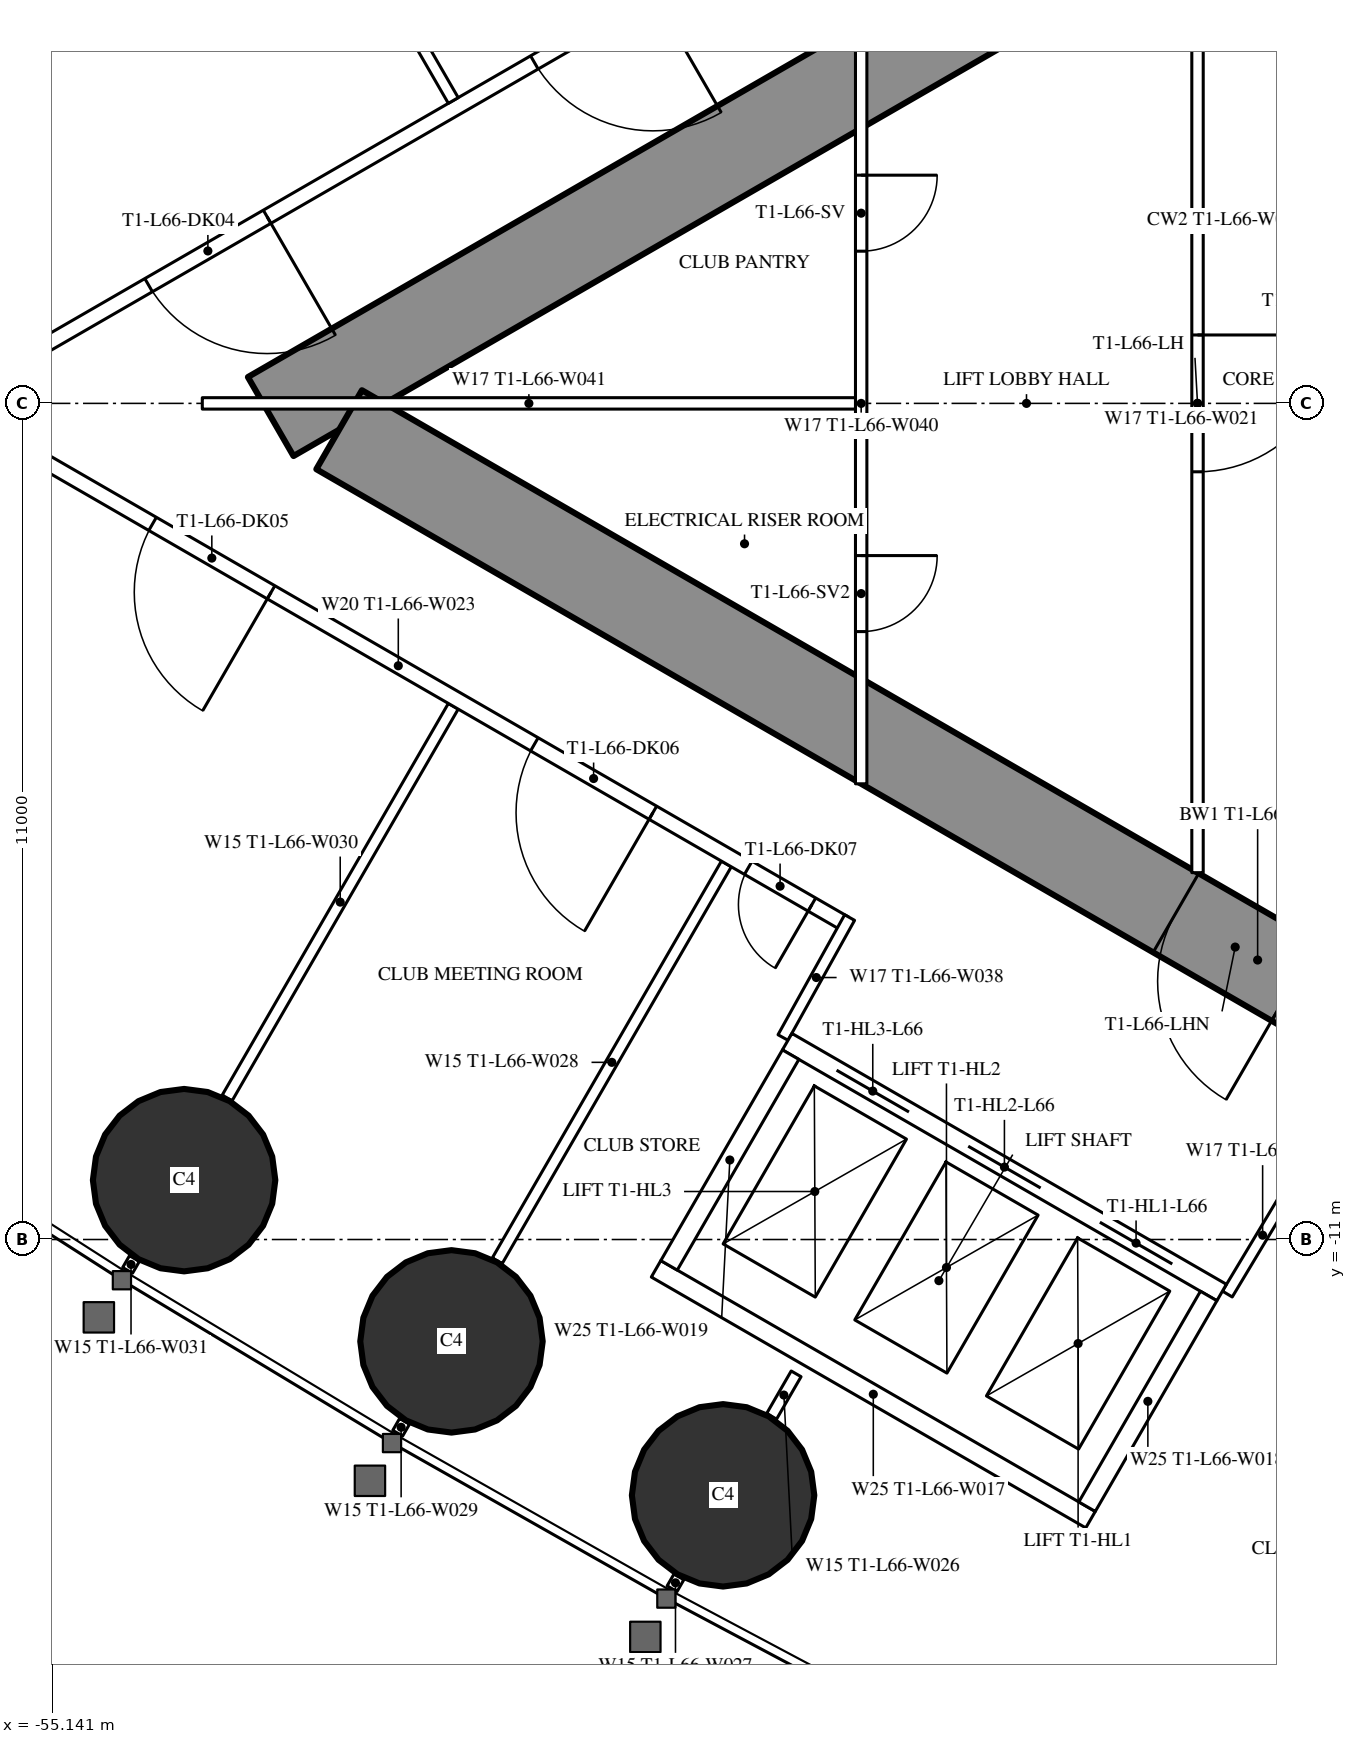
"""IFC4 building model, lengths in metres.
Left out: names, types, materials, properties, quantities, classifications, styles, units other than length and angle.
Written with IfcOpenShell. Run it as: python <this file> out.ifc"""

import sys

from ifc_helpers import new_model, si_unit, direction, frame, frame_2d, origin, origin_2d, place, context, subcontext, project, spatial, rectangle, circle, extrude, element, fill, save


model = new_model("IFC4")
c1 = context("Model", 3, precision=1e-05, world=origin(), true_north=direction((0.0, 1.0)))
c2 = subcontext(c1, "Body", "Model", "MODEL_VIEW")
j1 = project(units=[si_unit("LENGTHUNIT", "METRE"), si_unit("PLANEANGLEUNIT", "RADIAN")], contexts=[c1])
p1 = place(None, origin())
s1 = spatial("IfcSite", under=j1, at=p1, CompositionType="ELEMENT")
p2 = place(p1, origin())
s2 = spatial("IfcBuilding", under=s1, at=p2, CompositionType="ELEMENT")
p3 = place(p2, frame((0.0, 0.0, 247.7)))
s3 = spatial("IfcBuildingStorey", under=s2, at=p3, CompositionType="ELEMENT", Elevation=247.7)
for number, where, z_axis, x_axis in (
    (1, (-53.408, -10.219, 0.0), (0.0, 0.0, 1.0), (1.0, 0.0, 0.0)),
    (2, (-49.89, -12.34, 0.0), (0.0, 0.0, 1.0), (1.0, 0.0, 0.0)),
    (3, (-46.317, -14.365, 0.0), (0.0, 0.0, 1.0), (1.0, 0.0, 0.0)),
):
    element("IfcColumn", number, at=place(p3, frame(where, z_axis=z_axis, x_axis=x_axis)), inside=s3, PredefinedType="COLUMN", context=c2, shape_type="SweptSolid", body=[
        extrude(circle(Radius=1.2, at=origin_2d()), origin(), (0.0, 0.0, 1.0), 4.2),
    ])
p4 = place(p3, frame((-27.2, 14.3, 0.0), z_axis=(0.0, 0.0, 1.0), x_axis=(-0.866026593062, -0.499997940104, 0.0)))
e4 = element("IfcWall", 4, at=p4, inside=s3, PredefinedType="SHEAR", context=c2, shape_type="SweptSolid", body=[
    extrude(rectangle(XDim=28.946, YDim=1.2, at=frame_2d((14.473, 0.0))), origin(), (0.0, 0.0, 1.0), 4.2),
])
p5 = place(p4, frame((4.6, 0.0, 0.0)))
e5 = element("IfcOpeningElement", 5, at=p5, cuts=e4, PredefinedType="OPENING", context=c2, shape_type="SweptSolid", body=[
    extrude(rectangle(XDim=1.0, YDim=2.2, at=frame_2d((0.5, 1.1))), frame((0.0, 0.61, 0.0), z_axis=(0.0, -1.0, 0.0), x_axis=(1.0, 0.0, 0.0)), (0.0, 0.0, 1.0), 1.22),
])
p6 = place(p4, frame((13.395, 0.0, 0.0)))
e6 = element("IfcOpeningElement", 6, at=p6, cuts=e4, PredefinedType="OPENING", context=c2, shape_type="SweptSolid", body=[
    extrude(rectangle(XDim=1.8, YDim=2.2, at=frame_2d((0.9, 1.1))), frame((0.0, 0.61, 0.0), z_axis=(0.0, -1.0, 0.0), x_axis=(1.0, 0.0, 0.0)), (0.0, 0.0, 1.0), 1.22),
])
p7 = place(p3, frame((-27.2, -14.3, 0.0), z_axis=(0.0, 0.0, 1.0), x_axis=(-0.866024021859, 0.500002393557, 0.0)))
e7 = element("IfcWall", 7, at=p7, inside=s3, PredefinedType="SHEAR", context=c2, shape_type="SweptSolid", body=[
    extrude(rectangle(XDim=27.907, YDim=1.2, at=frame_2d((13.954, 0.0))), origin(), (0.0, 0.0, 1.0), 4.2),
])
p8 = place(p7, frame((4.6, 0.0, 0.0)))
e8 = element("IfcOpeningElement", 8, at=p8, cuts=e7, PredefinedType="OPENING", context=c2, shape_type="SweptSolid", body=[
    extrude(rectangle(XDim=1.0, YDim=2.2, at=frame_2d((0.5, 1.1))), frame((0.0, 0.61, 0.0), z_axis=(0.0, -1.0, 0.0), x_axis=(1.0, 0.0, 0.0)), (0.0, 0.0, 1.0), 1.22),
])
p9 = place(p7, frame((13.395, 0.0, 0.0)))
e9 = element("IfcOpeningElement", 9, at=p9, cuts=e7, PredefinedType="OPENING", context=c2, shape_type="SweptSolid", body=[
    extrude(rectangle(XDim=1.8, YDim=2.2, at=frame_2d((0.9, 1.1))), frame((0.0, 0.61, 0.0), z_axis=(0.0, -1.0, 0.0), x_axis=(1.0, 0.0, 0.0)), (0.0, 0.0, 1.0), 1.22),
])
p10 = place(p3, frame((-28.681, 16.101, 0.0), z_axis=(0.0, 0.0, 1.0), x_axis=(-0.866024860443, -0.500000941094, 0.0)))
e10 = element("IfcWall", 10, at=p10, inside=s3, PredefinedType="PARTITIONING", context=c2, shape_type="SweptSolid", body=[
    extrude(rectangle(XDim=32.201, YDim=0.2, at=frame_2d((16.101, 0.0))), origin(), (0.0, 0.0, 1.0), 3.95),
])
p11 = place(p10, frame((7.266, 0.0, 0.0)))
e11 = element("IfcOpeningElement", 11, at=p11, cuts=e10, PredefinedType="OPENING", context=c2, shape_type="SweptSolid", body=[
    extrude(rectangle(XDim=1.8, YDim=2.2, at=frame_2d((0.9, 1.1))), frame((0.0, 0.11, 0.0), z_axis=(0.0, -1.0, 0.0), x_axis=(1.0, 0.0, 0.0)), (0.0, 0.0, 1.0), 0.22),
])
p12 = place(p10, frame((17.281, 0.0, 0.0)))
e12 = element("IfcOpeningElement", 12, at=p12, cuts=e10, PredefinedType="OPENING", context=c2, shape_type="SweptSolid", body=[
    extrude(rectangle(XDim=1.8, YDim=2.2, at=frame_2d((0.9, 1.1))), frame((0.0, 0.11, 0.0), z_axis=(0.0, -1.0, 0.0), x_axis=(1.0, 0.0, 0.0)), (0.0, 0.0, 1.0), 0.22),
])
p13 = place(p10, frame((21.43, 0.0, 0.0)))
e13 = element("IfcOpeningElement", 13, at=p13, cuts=e10, PredefinedType="OPENING", context=c2, shape_type="SweptSolid", body=[
    extrude(rectangle(XDim=1.8, YDim=2.2, at=frame_2d((0.9, 1.1))), frame((0.0, 0.11, 0.0), z_axis=(0.0, -1.0, 0.0), x_axis=(1.0, 0.0, 0.0)), (0.0, 0.0, 1.0), 0.22),
])
p14 = place(p10, frame((27.29, 0.0, 0.0)))
e14 = element("IfcOpeningElement", 14, at=p14, cuts=e10, PredefinedType="OPENING", context=c2, shape_type="SweptSolid", body=[
    extrude(rectangle(XDim=1.8, YDim=2.2, at=frame_2d((0.9, 1.1))), frame((0.0, 0.11, 0.0), z_axis=(0.0, -1.0, 0.0), x_axis=(1.0, 0.0, 0.0)), (0.0, 0.0, 1.0), 0.22),
])
p15 = place(p3, frame((-49.866, 3.985, 0.0), z_axis=(0.0, 0.0, 1.0), x_axis=(-0.500000694566, 0.866025002776, 0.0)))
e15 = element("IfcWall", 15, at=p15, inside=s3, PredefinedType="PARTITIONING", context=c2, shape_type="SweptSolid", body=[
    extrude(rectangle(XDim=5.95, YDim=0.15, at=frame_2d((2.975, 0.0))), origin(), (0.0, 0.0, 1.0), 3.05),
])
p16 = place(p3, frame((-46.898, -15.439, 0.0), z_axis=(0.0, 0.0, 1.0), x_axis=(-0.500232303069, -0.865891241997, 0.0)))
e16 = element("IfcWall", 16, at=p16, inside=s3, PredefinedType="PARTITIONING", context=c2, shape_type="SweptSolid", body=[
    extrude(rectangle(XDim=0.18, YDim=0.15, at=frame_2d((0.09, 0.0))), origin(), (0.0, 0.0, 1.0), 3.05),
])
p17 = place(p3, frame((-46.274, -6.059, 0.0), z_axis=(0.0, 0.0, 1.0), x_axis=(-0.500020471368, -0.866013584312, 0.0)))
e17 = element("IfcWall", 17, at=p17, inside=s3, PredefinedType="PARTITIONING", context=c2, shape_type="SweptSolid", body=[
    extrude(rectangle(XDim=6.028, YDim=0.15, at=frame_2d((3.014, 0.0))), origin(), (0.0, 0.0, 1.0), 3.05),
])
p18 = place(p3, frame((-50.508, -13.392, 0.0), z_axis=(0.0, 0.0, 1.0), x_axis=(-0.499644091975, -0.866230789891, 0.0)))
e18 = element("IfcWall", 18, at=p18, inside=s3, PredefinedType="PARTITIONING", context=c2, shape_type="SweptSolid", body=[
    extrude(rectangle(XDim=0.18, YDim=0.15, at=frame_2d((0.09, 0.0))), origin(), (0.0, 0.0, 1.0), 3.05),
])
p19 = place(p3, frame((-49.866, -3.985, 0.0), z_axis=(0.0, 0.0, 1.0), x_axis=(-0.500000694566, -0.866025002776, 0.0)))
e19 = element("IfcWall", 19, at=p19, inside=s3, PredefinedType="PARTITIONING", context=c2, shape_type="SweptSolid", body=[
    extrude(rectangle(XDim=5.95, YDim=0.15, at=frame_2d((2.975, 0.0))), origin(), (0.0, 0.0, 1.0), 3.05),
])
p20 = place(p3, frame((-54.061, -11.25, 0.0), z_axis=(0.0, 0.0, 1.0), x_axis=(-0.500391173478, -0.865799441849, 0.0)))
e20 = element("IfcWall", 20, at=p20, inside=s3, PredefinedType="PARTITIONING", context=c2, shape_type="SweptSolid", body=[
    extrude(rectangle(XDim=0.179, YDim=0.15, at=frame_2d((0.089, 0.0))), origin(), (0.0, 0.0, 1.0), 3.05),
])
p21 = place(p3, frame((-45.356, -12.767, 0.0), z_axis=(0.0, 0.0, 1.0), x_axis=(-0.499886366516, -0.866091000168, 0.0)))
e21 = element("IfcWall", 21, at=p21, inside=s3, PredefinedType="PARTITIONING", context=c2, shape_type="SweptSolid", body=[
    extrude(rectangle(XDim=0.645, YDim=0.15, at=frame_2d((0.322, 0.0))), origin(), (0.0, 0.0, 1.0), 3.95),
])
p22 = place(p3, frame((-44.715, -6.844, 0.0), z_axis=(0.0, 0.0, 1.0), x_axis=(-0.866025261224, 0.500000246922, 0.0)))
e22 = element("IfcWall", 22, at=p22, inside=s3, PredefinedType="PARTITIONING", context=c2, shape_type="SweptSolid", body=[
    extrude(rectangle(XDim=13.567, YDim=0.2, at=frame_2d((6.783, 0.0))), origin(), (0.0, 0.0, 1.0), 3.95),
])
p23 = place(p22, frame((8.716, 0.0, 0.0)))
e23 = element("IfcOpeningElement", 23, at=p23, cuts=e22, PredefinedType="OPENING", context=c2, shape_type="SweptSolid", body=[
    extrude(rectangle(XDim=1.8, YDim=2.2, at=frame_2d((0.9, 1.1))), frame((0.0, 0.11, 0.0), z_axis=(0.0, -1.0, 0.0), x_axis=(1.0, 0.0, 0.0)), (0.0, 0.0, 1.0), 0.22),
])
p24 = place(p22, frame((2.916, 0.0, 0.0)))
e24 = element("IfcOpeningElement", 24, at=p24, cuts=e22, PredefinedType="OPENING", context=c2, shape_type="SweptSolid", body=[
    extrude(rectangle(XDim=1.8, YDim=2.2, at=frame_2d((0.9, 1.1))), frame((0.0, 0.11, 0.0), z_axis=(0.0, -1.0, 0.0), x_axis=(1.0, 0.0, 0.0)), (0.0, 0.0, 1.0), 0.22),
])
p25 = place(p22, frame((0.5, 0.0, 0.0)))
e25 = element("IfcOpeningElement", 25, at=p25, cuts=e22, PredefinedType="OPENING", context=c2, shape_type="SweptSolid", body=[
    extrude(rectangle(XDim=0.967, YDim=2.2, at=frame_2d((0.483, 1.1))), frame((0.0, 0.11, 0.0), z_axis=(0.0, -1.0, 0.0), x_axis=(1.0, 0.0, 0.0)), (0.0, 0.0, 1.0), 0.22),
])
for number, where, z_axis, x_axis in (
    (26, (-44.652, -6.764, 0.0), (0.0, 0.0, 1.0), (-0.486, -0.874, 0.0)),
    (27, (-39.683, -11.718, 0.0), (0.0, 0.0, 1.0), (0.514, 0.858, 0.0)),
):
    element("IfcWall", number, at=place(p3, frame(where, z_axis=z_axis, x_axis=x_axis)), inside=s3, PredefinedType="PARTITIONING", context=c2, shape_type="SweptSolid", body=[
        extrude(rectangle(XDim=1.805, YDim=0.15, at=frame_2d((0.903, 0.0))), origin(), (0.0, 0.0, 1.0), 3.95),
    ])
p26 = place(p3, frame((-40.075, 6.174, 0.0), z_axis=(0.0, 0.0, 1.0), x_axis=(0.0, -1.0, 0.0)))
e28 = element("IfcWall", 28, at=p26, inside=s3, PredefinedType="PARTITIONING", context=c2, shape_type="SweptSolid", body=[
    extrude(rectangle(XDim=12.348, YDim=0.15, at=frame_2d((6.174, 0.0))), origin(), (0.0, 0.0, 1.0), 3.95),
])
p27 = place(p26, frame((5.274, 0.0, 0.0)))
e29 = element("IfcOpeningElement", 29, at=p27, cuts=e28, PredefinedType="OPENING", context=c2, shape_type="SweptSolid", body=[
    extrude(rectangle(XDim=1.8, YDim=2.2, at=frame_2d((0.9, 1.1))), frame((0.0, 0.085, 0.0), z_axis=(0.0, -1.0, 0.0), x_axis=(1.0, 0.0, 0.0)), (0.0, 0.0, 1.0), 0.17),
])
p28 = place(p3, frame((-44.5, 5.005, 0.0), z_axis=(0.0, 0.0, 1.0), x_axis=(0.0, -1.0, 0.0)))
e30 = element("IfcWall", 30, at=p28, inside=s3, PredefinedType="PARTITIONING", context=c2, shape_type="SweptSolid", body=[
    extrude(rectangle(XDim=10.009, YDim=0.15, at=frame_2d((5.005, 0.0))), origin(), (0.0, 0.0, 1.0), 3.1),
])
p29 = place(p28, frame((2.002, 0.0, 0.0)))
e31 = element("IfcOpeningElement", 31, at=p29, cuts=e30, PredefinedType="OPENING", context=c2, shape_type="SweptSolid", body=[
    extrude(rectangle(XDim=1.0, YDim=2.2, at=frame_2d((0.5, 1.1))), frame((0.0, 0.085, 0.0), z_axis=(0.0, -1.0, 0.0), x_axis=(1.0, 0.0, 0.0)), (0.0, 0.0, 1.0), 0.17),
])
p30 = place(p28, frame((7.007, 0.0, 0.0)))
e32 = element("IfcOpeningElement", 32, at=p30, cuts=e30, PredefinedType="OPENING", context=c2, shape_type="SweptSolid", body=[
    extrude(rectangle(XDim=1.0, YDim=2.2, at=frame_2d((0.5, 1.1))), frame((0.0, 0.085, 0.0), z_axis=(0.0, -1.0, 0.0), x_axis=(1.0, 0.0, 0.0)), (0.0, 0.0, 1.0), 0.17),
])
p31 = place(p3, frame((-44.575, 0.0, 0.0), z_axis=(0.0, 0.0, 1.0), x_axis=(-1.0, 0.0, 0.0)))
e33 = element("IfcWall", 33, at=p31, inside=s3, PredefinedType="PARTITIONING", context=c2, shape_type="SweptSolid", body=[
    extrude(rectangle(XDim=8.593, YDim=0.15, at=frame_2d((4.297, 0.0))), origin(), (0.0, 0.0, 1.0), 3.05),
])
p32 = place(p3, frame((-39.758, -11.697, 0.0), z_axis=(0.0, 0.0, 1.0), x_axis=(-0.866024194504, 0.500002094529, 0.0)))
e34 = element("IfcWall", 34, at=p32, inside=s3, PredefinedType="PARTITIONING", context=c2, shape_type="SweptSolid", body=[
    extrude(rectangle(XDim=6.6, YDim=0.25, at=frame_2d((3.3, 0.0))), origin(), (0.0, 0.0, 1.0), 3.95),
])
p33 = place(p32, frame((0.75, 0.0, 0.0)))
e35 = element("IfcOpeningElement", 35, at=p33, cuts=e34, PredefinedType="OPENING", context=c2, shape_type="SweptSolid", body=[
    extrude(rectangle(XDim=1.1, YDim=2.2, at=frame_2d((0.55, 1.1))), frame((0.0, 0.135, 0.0), z_axis=(0.0, -1.0, 0.0), x_axis=(1.0, 0.0, 0.0)), (0.0, 0.0, 1.0), 0.27),
])
p34 = place(p32, frame((2.75, 0.0, 0.0)))
e36 = element("IfcOpeningElement", 36, at=p34, cuts=e34, PredefinedType="OPENING", context=c2, shape_type="SweptSolid", body=[
    extrude(rectangle(XDim=1.1, YDim=2.2, at=frame_2d((0.55, 1.1))), frame((0.0, 0.135, 0.0), z_axis=(0.0, -1.0, 0.0), x_axis=(1.0, 0.0, 0.0)), (0.0, 0.0, 1.0), 0.27),
])
p35 = place(p32, frame((4.75, 0.0, 0.0)))
e37 = element("IfcOpeningElement", 37, at=p35, cuts=e34, PredefinedType="OPENING", context=c2, shape_type="SweptSolid", body=[
    extrude(rectangle(XDim=1.1, YDim=2.2, at=frame_2d((0.55, 1.1))), frame((0.0, 0.135, 0.0), z_axis=(0.0, -1.0, 0.0), x_axis=(1.0, 0.0, 0.0)), (0.0, 0.0, 1.0), 0.27),
])
p36 = place(p3, frame((-41.482, -14.686, 0.0), z_axis=(0.0, 0.0, 1.0), x_axis=(-0.86603344179, 0.499986077507, 0.0)))
e38 = element("IfcWall", 38, at=p36, inside=s3, PredefinedType="PARTITIONING", context=c2, shape_type="SweptSolid", body=[
    extrude(rectangle(XDim=6.6, YDim=0.25, at=frame_2d((3.3, 0.0))), origin(), (0.0, 0.0, 1.0), 3.95),
])
for number, where, z_axis, x_axis in (
    (39, (-39.928, -11.743, 0.0), (0.0, 0.0, 1.0), (-0.5, -0.866, 0.0)),
    (40, (-45.428, -8.568, 0.0), (0.0, 0.0, 1.0), (-0.5, -0.866, 0.0)),
):
    element("IfcWall", number, at=place(p3, frame(where, z_axis=z_axis, x_axis=x_axis)), inside=s3, PredefinedType="PARTITIONING", context=c2, shape_type="SweptSolid", body=[
        extrude(rectangle(XDim=3.201, YDim=0.25, at=frame_2d((1.6, 0.0))), origin(), (0.0, 0.0, 1.0), 3.95),
    ])
p37 = place(p13, origin())
e41 = element("IfcDoor", 41, at=p37, inside=s3, OperationType="DOUBLE_DOOR_SINGLE_SWING", PredefinedType="DOOR", context=c2, shape_type="SweptSolid", body=[
    extrude(rectangle(XDim=1.8, YDim=2.2, at=frame_2d((0.9, 1.1))), frame((0.0, 0.025, 0.0), z_axis=(0.0, -1.0, 0.0), x_axis=(1.0, 0.0, 0.0)), (0.0, 0.0, 1.0), 0.05),
])
fill(e13, e41)
p38 = place(p14, origin())
e42 = element("IfcDoor", 42, at=p38, inside=s3, OperationType="DOUBLE_DOOR_SINGLE_SWING", PredefinedType="DOOR", context=c2, shape_type="SweptSolid", body=[
    extrude(rectangle(XDim=1.8, YDim=2.2, at=frame_2d((0.9, 1.1))), frame((0.0, 0.025, 0.0), z_axis=(0.0, -1.0, 0.0), x_axis=(1.0, 0.0, 0.0)), (0.0, 0.0, 1.0), 0.05),
])
fill(e14, e42)
p39 = place(p23, origin())
e43 = element("IfcDoor", 43, at=p39, inside=s3, OperationType="DOUBLE_DOOR_SINGLE_SWING", PredefinedType="DOOR", context=c2, shape_type="SweptSolid", body=[
    extrude(rectangle(XDim=1.8, YDim=2.2, at=frame_2d((0.9, 1.1))), frame((0.0, 0.025, 0.0), z_axis=(0.0, -1.0, 0.0), x_axis=(1.0, 0.0, 0.0)), (0.0, 0.0, 1.0), 0.05),
])
fill(e23, e43)
p40 = place(p24, origin())
e44 = element("IfcDoor", 44, at=p40, inside=s3, OperationType="DOUBLE_DOOR_SINGLE_SWING", PredefinedType="DOOR", context=c2, shape_type="SweptSolid", body=[
    extrude(rectangle(XDim=1.8, YDim=2.2, at=frame_2d((0.9, 1.1))), frame((0.0, 0.025, 0.0), z_axis=(0.0, -1.0, 0.0), x_axis=(1.0, 0.0, 0.0)), (0.0, 0.0, 1.0), 0.05),
])
fill(e24, e44)
p41 = place(p25, origin())
e45 = element("IfcDoor", 45, at=p41, inside=s3, OperationType="SINGLE_SWING_LEFT", PredefinedType="DOOR", context=c2, shape_type="SweptSolid", body=[
    extrude(rectangle(XDim=0.967, YDim=2.2, at=frame_2d((0.483, 1.1))), frame((0.0, 0.025, 0.0), z_axis=(0.0, -1.0, 0.0), x_axis=(1.0, 0.0, 0.0)), (0.0, 0.0, 1.0), 0.05),
])
fill(e25, e45)
p42 = place(p27, origin())
e46 = element("IfcDoor", 46, at=p42, inside=s3, OperationType="DOUBLE_DOOR_SINGLE_SWING", PredefinedType="DOOR", context=c2, shape_type="SweptSolid", body=[
    extrude(rectangle(XDim=1.8, YDim=2.2, at=frame_2d((0.9, 1.1))), frame((0.0, 0.025, 0.0), z_axis=(0.0, -1.0, 0.0), x_axis=(1.0, 0.0, 0.0)), (0.0, 0.0, 1.0), 0.05),
])
fill(e29, e46)
p43 = place(p29, origin())
e47 = element("IfcDoor", 47, at=p43, inside=s3, OperationType="SINGLE_SWING_LEFT", PredefinedType="DOOR", context=c2, shape_type="SweptSolid", body=[
    extrude(rectangle(XDim=1.0, YDim=2.2, at=frame_2d((0.5, 1.1))), frame((0.0, 0.025, 0.0), z_axis=(0.0, -1.0, 0.0), x_axis=(1.0, 0.0, 0.0)), (0.0, 0.0, 1.0), 0.05),
])
fill(e31, e47)
p44 = place(p30, origin())
e48 = element("IfcDoor", 48, at=p44, inside=s3, OperationType="SINGLE_SWING_LEFT", PredefinedType="DOOR", context=c2, shape_type="SweptSolid", body=[
    extrude(rectangle(XDim=1.0, YDim=2.2, at=frame_2d((0.5, 1.1))), frame((0.0, 0.025, 0.0), z_axis=(0.0, -1.0, 0.0), x_axis=(1.0, 0.0, 0.0)), (0.0, 0.0, 1.0), 0.05),
])
fill(e32, e48)
p45 = place(p9, origin())
e49 = element("IfcDoor", 49, at=p45, inside=s3, OperationType="DOUBLE_DOOR_SINGLE_SWING", PredefinedType="DOOR", context=c2, shape_type="SweptSolid", body=[
    extrude(rectangle(XDim=1.8, YDim=2.2, at=frame_2d((0.9, 1.1))), frame((0.0, 0.025, 0.0), z_axis=(0.0, -1.0, 0.0), x_axis=(1.0, 0.0, 0.0)), (0.0, 0.0, 1.0), 0.05),
])
fill(e9, e49)
p46 = place(p33, origin())
e50 = element("IfcDoor", 50, at=p46, inside=s3, OperationType="DOUBLE_DOOR_SLIDING", PredefinedType="USERDEFINED", context=c2, shape_type="SweptSolid", body=[
    extrude(rectangle(XDim=1.1, YDim=2.2, at=frame_2d((0.55, 1.1))), frame((0.0, 0.025, 0.0), z_axis=(0.0, -1.0, 0.0), x_axis=(1.0, 0.0, 0.0)), (0.0, 0.0, 1.0), 0.05),
])
fill(e35, e50)
p47 = place(p34, origin())
e51 = element("IfcDoor", 51, at=p47, inside=s3, OperationType="DOUBLE_DOOR_SLIDING", PredefinedType="USERDEFINED", context=c2, shape_type="SweptSolid", body=[
    extrude(rectangle(XDim=1.1, YDim=2.2, at=frame_2d((0.55, 1.1))), frame((0.0, 0.025, 0.0), z_axis=(0.0, -1.0, 0.0), x_axis=(1.0, 0.0, 0.0)), (0.0, 0.0, 1.0), 0.05),
])
fill(e36, e51)
p48 = place(p35, origin())
e52 = element("IfcDoor", 52, at=p48, inside=s3, OperationType="DOUBLE_DOOR_SLIDING", PredefinedType="USERDEFINED", context=c2, shape_type="SweptSolid", body=[
    extrude(rectangle(XDim=1.1, YDim=2.2, at=frame_2d((0.55, 1.1))), frame((0.0, 0.025, 0.0), z_axis=(0.0, -1.0, 0.0), x_axis=(1.0, 0.0, 0.0)), (0.0, 0.0, 1.0), 0.05),
])
fill(e37, e52)
save(model, sys.argv[1])
